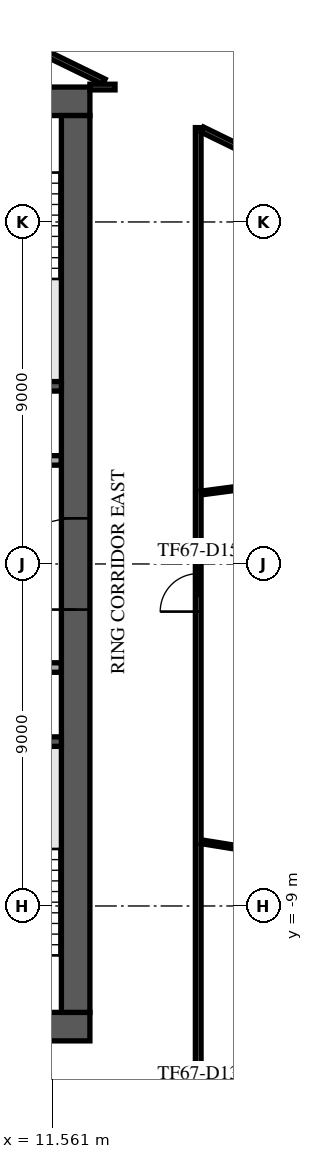
"""IFC4 building model, lengths in metres.
Left out: names, types, materials, properties, quantities, classifications, styles, units other than length and angle.
Written with IfcOpenShell. Run it as: python <this file> out.ifc"""

import sys

from ifc_helpers import new_model, si_unit, direction, frame, frame_2d, origin, place, context, subcontext, project, spatial, rectangle, extrude, element, fill, save


model = new_model("IFC4")
c1 = context("Model", 3, precision=1e-05, world=origin(), true_north=direction((0.0, 1.0)))
c2 = subcontext(c1, "Body", "Model", "MODEL_VIEW")
j1 = project(units=[si_unit("LENGTHUNIT", "METRE"), si_unit("PLANEANGLEUNIT", "RADIAN")], contexts=[c1])
p1 = place(None, origin())
s1 = spatial("IfcSite", under=j1, at=p1, CompositionType="ELEMENT")
p2 = place(p1, origin())
s2 = spatial("IfcBuilding", under=s1, at=p2, CompositionType="ELEMENT")
p3 = place(p2, frame((0.0, 0.0, 282.9)))
s3 = spatial("IfcBuildingStorey", under=s2, at=p3, CompositionType="ELEMENT", Elevation=282.9)
p4 = place(p3, frame((-12.55, 12.175, 0.0), z_axis=(0.0, 0.0, 1.0), x_axis=(1.0, 0.0, 0.0)))
e1 = element("IfcWall", 1, at=p4, inside=s3, PredefinedType="SHEAR", context=c2, shape_type="SweptSolid", body=[
    extrude(rectangle(XDim=25.1, YDim=0.75, at=frame_2d((12.55, 0.0))), origin(), (0.0, 0.0, 1.0), 3.64),
])
p5 = place(p4, frame((11.35, 0.0, 0.0)))
e2 = element("IfcOpeningElement", 2, at=p5, cuts=e1, PredefinedType="OPENING", context=c2, shape_type="SweptSolid", body=[
    extrude(rectangle(XDim=2.4, YDim=2.4, at=frame_2d((1.2, 1.2))), frame((0.0, 0.385, 0.0), z_axis=(0.0, -1.0, 0.0), x_axis=(1.0, 0.0, 0.0)), (0.0, 0.0, 1.0), 0.77),
])
p6 = place(p4, frame((22.175, 0.0, 0.0)))
e3 = element("IfcOpeningElement", 3, at=p6, cuts=e1, PredefinedType="OPENING", context=c2, shape_type="SweptSolid", body=[
    extrude(rectangle(XDim=1.2, YDim=2.1, at=frame_2d((0.6, 1.05))), frame((0.0, 0.385, 0.0), z_axis=(0.0, -1.0, 0.0), x_axis=(1.0, 0.0, 0.0)), (0.0, 0.0, 1.0), 0.77),
])
p7 = place(p4, frame((1.15, 0.0, 0.0)))
e4 = element("IfcOpeningElement", 4, at=p7, cuts=e1, PredefinedType="OPENING", context=c2, shape_type="SweptSolid", body=[
    extrude(rectangle(XDim=1.0, YDim=2.1, at=frame_2d((0.5, 1.05))), frame((0.0, 0.385, 0.0), z_axis=(0.0, -1.0, 0.0), x_axis=(1.0, 0.0, 0.0)), (0.0, 0.0, 1.0), 0.77),
])
p8 = place(p3, frame((-12.55, -12.175, 0.0), z_axis=(0.0, 0.0, 1.0), x_axis=(1.0, 0.0, 0.0)))
e5 = element("IfcWall", 5, at=p8, inside=s3, PredefinedType="SHEAR", context=c2, shape_type="SweptSolid", body=[
    extrude(rectangle(XDim=25.1, YDim=0.75, at=frame_2d((12.55, 0.0))), origin(), (0.0, 0.0, 1.0), 3.64),
])
p9 = place(p8, frame((7.45, 0.0, 0.0)))
e6 = element("IfcOpeningElement", 6, at=p9, cuts=e5, PredefinedType="OPENING", context=c2, shape_type="SweptSolid", body=[
    extrude(rectangle(XDim=2.0, YDim=2.1, at=frame_2d((1.0, 1.05))), frame((0.0, 0.385, 0.0), z_axis=(0.0, -1.0, 0.0), x_axis=(1.0, 0.0, 0.0)), (0.0, 0.0, 1.0), 0.77),
])
p10 = place(p8, frame((17.575, 0.0, 0.0)))
e7 = element("IfcOpeningElement", 7, at=p10, cuts=e5, PredefinedType="OPENING", context=c2, shape_type="SweptSolid", body=[
    extrude(rectangle(XDim=1.2, YDim=2.1, at=frame_2d((0.6, 1.05))), frame((0.0, 0.385, 0.0), z_axis=(0.0, -1.0, 0.0), x_axis=(1.0, 0.0, 0.0)), (0.0, 0.0, 1.0), 0.77),
])
p11 = place(p8, frame((1.725, 0.0, 0.0)))
e8 = element("IfcOpeningElement", 8, at=p11, cuts=e5, PredefinedType="OPENING", context=c2, shape_type="SweptSolid", body=[
    extrude(rectangle(XDim=1.2, YDim=2.1, at=frame_2d((0.6, 1.05))), frame((0.0, 0.385, 0.0), z_axis=(0.0, -1.0, 0.0), x_axis=(1.0, 0.0, 0.0)), (0.0, 0.0, 1.0), 0.77),
])
p12 = place(p8, frame((22.175, 0.0, 0.0)))
e9 = element("IfcOpeningElement", 9, at=p12, cuts=e5, PredefinedType="OPENING", context=c2, shape_type="SweptSolid", body=[
    extrude(rectangle(XDim=1.2, YDim=2.1, at=frame_2d((0.6, 1.05))), frame((0.0, 0.385, 0.0), z_axis=(0.0, -1.0, 0.0), x_axis=(1.0, 0.0, 0.0)), (0.0, 0.0, 1.0), 0.77),
])
p13 = place(p3, frame((12.175, -11.8, 0.0), z_axis=(0.0, 0.0, 1.0), x_axis=(0.0, 1.0, 0.0)))
e10 = element("IfcWall", 10, at=p13, inside=s3, PredefinedType="SHEAR", context=c2, shape_type="SweptSolid", body=[
    extrude(rectangle(XDim=23.6, YDim=0.75, at=frame_2d((11.8, 0.0))), origin(), (0.0, 0.0, 1.0), 3.64),
])
p14 = place(p13, frame((10.6, 0.0, 0.0)))
e11 = element("IfcOpeningElement", 11, at=p14, cuts=e10, PredefinedType="OPENING", context=c2, shape_type="SweptSolid", body=[
    extrude(rectangle(XDim=2.4, YDim=2.4, at=frame_2d((1.2, 1.2))), frame((0.0, 0.385, 0.0), z_axis=(0.0, -1.0, 0.0), x_axis=(1.0, 0.0, 0.0)), (0.0, 0.0, 1.0), 0.77),
])
for number, where, z_axis, x_axis in (
    (12, (8.65, 4.675, 0.0), (0.0, 0.0, 1.0), (1.0, 0.0, 0.0)),
    (13, (8.65, -4.675, 0.0), (0.0, 0.0, 1.0), (1.0, 0.0, 0.0)),
):
    element("IfcWall", number, at=place(p3, frame(where, z_axis=z_axis, x_axis=x_axis)), inside=s3, PredefinedType="SOLIDWALL", context=c2, shape_type="SweptSolid", body=[
        extrude(rectangle(XDim=3.15, YDim=0.25, at=frame_2d((1.575, 0.0))), origin(), (0.0, 0.0, 1.0), 3.64),
    ])
p15 = place(p3, frame((5.63, -2.725, 0.0), z_axis=(0.0, 0.0, 1.0), x_axis=(1.0, 0.0, 0.0)))
e14 = element("IfcWall", 14, at=p15, inside=s3, PredefinedType="PARTITIONING", context=c2, shape_type="SweptSolid", body=[
    extrude(rectangle(XDim=6.165, YDim=0.25, at=frame_2d((3.083, 0.0))), origin(), (0.0, 0.0, 1.0), 3.64),
])
p16 = place(p15, frame((0.745, 0.0, 0.0)))
e15 = element("IfcOpeningElement", 15, at=p16, cuts=e14, PredefinedType="OPENING", context=c2, shape_type="SweptSolid", body=[
    extrude(rectangle(XDim=1.0, YDim=2.1, at=frame_2d((0.5, 1.05))), frame((0.0, 0.135, 0.0), z_axis=(0.0, -1.0, 0.0), x_axis=(1.0, 0.0, 0.0)), (0.0, 0.0, 1.0), 0.27),
])
p17 = place(p15, frame((3.92, 0.0, 0.0)))
e16 = element("IfcOpeningElement", 16, at=p17, cuts=e14, PredefinedType="OPENING", context=c2, shape_type="SweptSolid", body=[
    extrude(rectangle(XDim=0.9, YDim=2.1, at=frame_2d((0.45, 1.05))), frame((0.0, 0.135, 0.0), z_axis=(0.0, -1.0, 0.0), x_axis=(1.0, 0.0, 0.0)), (0.0, 0.0, 1.0), 0.27),
])
p18 = place(p3, frame((-11.795, 2.725, 0.0), z_axis=(0.0, 0.0, 1.0), x_axis=(1.0, 0.0, 0.0)))
e17 = element("IfcWall", 17, at=p18, inside=s3, PredefinedType="PARTITIONING", context=c2, shape_type="SweptSolid", body=[
    extrude(rectangle(XDim=23.59, YDim=0.25, at=frame_2d((11.795, 0.0))), origin(), (0.0, 0.0, 1.0), 3.64),
])
p19 = place(p18, frame((21.345, 0.0, 0.0)))
e18 = element("IfcOpeningElement", 18, at=p19, cuts=e17, PredefinedType="OPENING", context=c2, shape_type="SweptSolid", body=[
    extrude(rectangle(XDim=0.9, YDim=2.1, at=frame_2d((0.45, 1.05))), frame((0.0, 0.135, 0.0), z_axis=(0.0, -1.0, 0.0), x_axis=(1.0, 0.0, 0.0)), (0.0, 0.0, 1.0), 0.27),
])
p20 = place(p18, frame((1.345, 0.0, 0.0)))
e19 = element("IfcOpeningElement", 19, at=p20, cuts=e17, PredefinedType="OPENING", context=c2, shape_type="SweptSolid", body=[
    extrude(rectangle(XDim=0.9, YDim=2.1, at=frame_2d((0.45, 1.05))), frame((0.0, 0.135, 0.0), z_axis=(0.0, -1.0, 0.0), x_axis=(1.0, 0.0, 0.0)), (0.0, 0.0, 1.0), 0.27),
])
p21 = place(p18, frame((4.42, 0.0, 0.0)))
e20 = element("IfcOpeningElement", 20, at=p21, cuts=e17, PredefinedType="OPENING", context=c2, shape_type="SweptSolid", body=[
    extrude(rectangle(XDim=1.0, YDim=2.1, at=frame_2d((0.5, 1.05))), frame((0.0, 0.135, 0.0), z_axis=(0.0, -1.0, 0.0), x_axis=(1.0, 0.0, 0.0)), (0.0, 0.0, 1.0), 0.27),
])
p22 = place(p18, frame((7.17, 0.0, 0.0)))
e21 = element("IfcOpeningElement", 21, at=p22, cuts=e17, PredefinedType="OPENING", context=c2, shape_type="SweptSolid", body=[
    extrude(rectangle(XDim=1.0, YDim=2.1, at=frame_2d((0.5, 1.05))), frame((0.0, 0.135, 0.0), z_axis=(0.0, -1.0, 0.0), x_axis=(1.0, 0.0, 0.0)), (0.0, 0.0, 1.0), 0.27),
])
p23 = place(p18, frame((12.57, 0.0, 0.0)))
e22 = element("IfcOpeningElement", 22, at=p23, cuts=e17, PredefinedType="OPENING", context=c2, shape_type="SweptSolid", body=[
    extrude(rectangle(XDim=1.2, YDim=2.1, at=frame_2d((0.6, 1.05))), frame((0.0, 0.135, 0.0), z_axis=(0.0, -1.0, 0.0), x_axis=(1.0, 0.0, 0.0)), (0.0, 0.0, 1.0), 0.27),
])
p24 = place(p3, frame((10.36, -32.137, 0.0), z_axis=(0.0, 0.0, 1.0), x_axis=(0.438372256832, 0.898793504894, 0.0)))
e23 = element("IfcWall", 23, at=p24, inside=s3, PredefinedType="STANDARD", context=c2, shape_type="SweptSolid", body=[
    extrude(rectangle(XDim=48.687, YDim=0.6, at=frame_2d((24.343, 0.0))), origin(), (0.0, 0.0, 1.0), 3.64),
])
p25 = place(p24, frame((1.213, 0.0, 0.9)))
e24 = element("IfcOpeningElement", 24, at=p25, cuts=e23, PredefinedType="OPENING", context=c2, shape_type="SweptSolid", body=[
    extrude(rectangle(XDim=2.0, YDim=2.1, at=frame_2d((1.0, 1.05))), frame((0.0, 0.31, 0.0), z_axis=(0.0, -1.0, 0.0), x_axis=(1.0, 0.0, 0.0)), (0.0, 0.0, 1.0), 0.62),
])
p26 = place(p24, frame((5.639, 0.0, 0.9)))
e25 = element("IfcOpeningElement", 25, at=p26, cuts=e23, PredefinedType="OPENING", context=c2, shape_type="SweptSolid", body=[
    extrude(rectangle(XDim=2.0, YDim=2.1, at=frame_2d((1.0, 1.05))), frame((0.0, 0.31, 0.0), z_axis=(0.0, -1.0, 0.0), x_axis=(1.0, 0.0, 0.0)), (0.0, 0.0, 1.0), 0.62),
])
p27 = place(p24, frame((10.065, 0.0, 0.9)))
e26 = element("IfcOpeningElement", 26, at=p27, cuts=e23, PredefinedType="OPENING", context=c2, shape_type="SweptSolid", body=[
    extrude(rectangle(XDim=2.0, YDim=2.1, at=frame_2d((1.0, 1.05))), frame((0.0, 0.31, 0.0), z_axis=(0.0, -1.0, 0.0), x_axis=(1.0, 0.0, 0.0)), (0.0, 0.0, 1.0), 0.62),
])
p28 = place(p24, frame((14.491, 0.0, 0.9)))
e27 = element("IfcOpeningElement", 27, at=p28, cuts=e23, PredefinedType="OPENING", context=c2, shape_type="SweptSolid", body=[
    extrude(rectangle(XDim=2.0, YDim=2.1, at=frame_2d((1.0, 1.05))), frame((0.0, 0.31, 0.0), z_axis=(0.0, -1.0, 0.0), x_axis=(1.0, 0.0, 0.0)), (0.0, 0.0, 1.0), 0.62),
])
p29 = place(p24, frame((18.917, 0.0, 0.9)))
e28 = element("IfcOpeningElement", 28, at=p29, cuts=e23, PredefinedType="OPENING", context=c2, shape_type="SweptSolid", body=[
    extrude(rectangle(XDim=2.0, YDim=2.1, at=frame_2d((1.0, 1.05))), frame((0.0, 0.31, 0.0), z_axis=(0.0, -1.0, 0.0), x_axis=(1.0, 0.0, 0.0)), (0.0, 0.0, 1.0), 0.62),
])
p30 = place(p24, frame((23.343, 0.0, 0.9)))
e29 = element("IfcOpeningElement", 29, at=p30, cuts=e23, PredefinedType="OPENING", context=c2, shape_type="SweptSolid", body=[
    extrude(rectangle(XDim=2.0, YDim=2.1, at=frame_2d((1.0, 1.05))), frame((0.0, 0.31, 0.0), z_axis=(0.0, -1.0, 0.0), x_axis=(1.0, 0.0, 0.0)), (0.0, 0.0, 1.0), 0.62),
])
p31 = place(p24, frame((27.769, 0.0, 0.9)))
e30 = element("IfcOpeningElement", 30, at=p31, cuts=e23, PredefinedType="OPENING", context=c2, shape_type="SweptSolid", body=[
    extrude(rectangle(XDim=2.0, YDim=2.1, at=frame_2d((1.0, 1.05))), frame((0.0, 0.31, 0.0), z_axis=(0.0, -1.0, 0.0), x_axis=(1.0, 0.0, 0.0)), (0.0, 0.0, 1.0), 0.62),
])
p32 = place(p24, frame((32.195, 0.0, 0.9)))
e31 = element("IfcOpeningElement", 31, at=p32, cuts=e23, PredefinedType="OPENING", context=c2, shape_type="SweptSolid", body=[
    extrude(rectangle(XDim=2.0, YDim=2.1, at=frame_2d((1.0, 1.05))), frame((0.0, 0.31, 0.0), z_axis=(0.0, -1.0, 0.0), x_axis=(1.0, 0.0, 0.0)), (0.0, 0.0, 1.0), 0.62),
])
p33 = place(p24, frame((36.621, 0.0, 0.9)))
e32 = element("IfcOpeningElement", 32, at=p33, cuts=e23, PredefinedType="OPENING", context=c2, shape_type="SweptSolid", body=[
    extrude(rectangle(XDim=2.0, YDim=2.1, at=frame_2d((1.0, 1.05))), frame((0.0, 0.31, 0.0), z_axis=(0.0, -1.0, 0.0), x_axis=(1.0, 0.0, 0.0)), (0.0, 0.0, 1.0), 0.62),
])
p34 = place(p24, frame((41.047, 0.0, 0.9)))
e33 = element("IfcOpeningElement", 33, at=p34, cuts=e23, PredefinedType="OPENING", context=c2, shape_type="SweptSolid", body=[
    extrude(rectangle(XDim=2.0, YDim=2.1, at=frame_2d((1.0, 1.05))), frame((0.0, 0.31, 0.0), z_axis=(0.0, -1.0, 0.0), x_axis=(1.0, 0.0, 0.0)), (0.0, 0.0, 1.0), 0.62),
])
p35 = place(p24, frame((45.473, 0.0, 0.9)))
e34 = element("IfcOpeningElement", 34, at=p35, cuts=e23, PredefinedType="OPENING", context=c2, shape_type="SweptSolid", body=[
    extrude(rectangle(XDim=2.0, YDim=2.1, at=frame_2d((1.0, 1.05))), frame((0.0, 0.31, 0.0), z_axis=(0.0, -1.0, 0.0), x_axis=(1.0, 0.0, 0.0)), (0.0, 0.0, 1.0), 0.62),
])
p36 = place(p3, frame((-9.104, 26.104, 0.0), z_axis=(0.0, 0.0, 1.0), x_axis=(0.898795233888, -0.438368711864, 0.0)))
e35 = element("IfcWall", 35, at=p36, inside=s3, PredefinedType="PARTITIONING", context=c2, shape_type="SweptSolid", body=[
    extrude(rectangle(XDim=39.325, YDim=0.15, at=frame_2d((19.663, 0.0))), origin(), (0.0, 0.0, 1.0), 3.04),
])
p37 = place(p36, frame((2.8, 0.0, 0.0)))
e36 = element("IfcOpeningElement", 36, at=p37, cuts=e35, PredefinedType="OPENING", context=c2, shape_type="SweptSolid", body=[
    extrude(rectangle(XDim=1.8, YDim=2.1, at=frame_2d((0.9, 1.05))), frame((0.0, 0.085, 0.0), z_axis=(0.0, -1.0, 0.0), x_axis=(1.0, 0.0, 0.0)), (0.0, 0.0, 1.0), 0.17),
])
p38 = place(p36, frame((15.419, 0.0, 0.0)))
e37 = element("IfcOpeningElement", 37, at=p38, cuts=e35, PredefinedType="OPENING", context=c2, shape_type="SweptSolid", body=[
    extrude(rectangle(XDim=1.0, YDim=2.1, at=frame_2d((0.5, 1.05))), frame((0.0, 0.085, 0.0), z_axis=(0.0, -1.0, 0.0), x_axis=(1.0, 0.0, 0.0)), (0.0, 0.0, 1.0), 0.17),
])
p39 = place(p36, frame((19.371, 0.0, 0.0)))
e38 = element("IfcOpeningElement", 38, at=p39, cuts=e35, PredefinedType="OPENING", context=c2, shape_type="SweptSolid", body=[
    extrude(rectangle(XDim=1.0, YDim=2.1, at=frame_2d((0.5, 1.05))), frame((0.0, 0.085, 0.0), z_axis=(0.0, -1.0, 0.0), x_axis=(1.0, 0.0, 0.0)), (0.0, 0.0, 1.0), 0.17),
])
p40 = place(p3, frame((5.427, 16.347, 0.0), z_axis=(0.0, 0.0, 1.0), x_axis=(0.898771260275, -0.43841786198, 0.0)))
e39 = element("IfcWall", 39, at=p40, inside=s3, PredefinedType="PARTITIONING", context=c2, shape_type="SweptSolid", body=[
    extrude(rectangle(XDim=8.336, YDim=0.15, at=frame_2d((4.168, 0.0))), origin(), (0.0, 0.0, 1.0), 3.24),
])
p41 = place(p40, frame((2.3, 0.0, 0.0)))
e40 = element("IfcOpeningElement", 40, at=p41, cuts=e39, PredefinedType="OPENING", context=c2, shape_type="SweptSolid", body=[
    extrude(rectangle(XDim=1.0, YDim=2.1, at=frame_2d((0.5, 1.05))), frame((0.0, 0.085, 0.0), z_axis=(0.0, -1.0, 0.0), x_axis=(1.0, 0.0, 0.0)), (0.0, 0.0, 1.0), 0.17),
])
p42 = place(p3, frame((12.55, 12.55, 0.0), z_axis=(0.0, 0.0, 1.0), x_axis=(1.0, 0.0, 0.0)))
e41 = element("IfcWall", 41, at=p42, inside=s3, PredefinedType="PARTITIONING", context=c2, shape_type="SweptSolid", body=[
    extrude(rectangle(XDim=0.661, YDim=0.15, at=frame_2d((0.331, 0.0))), origin(), (0.0, 0.0, 1.0), 3.24),
])
p43 = place(p3, frame((15.4, -15.325, 0.0), z_axis=(0.0, 0.0, 1.0), x_axis=(0.0, 1.0, 0.0)))
e42 = element("IfcWall", 42, at=p43, inside=s3, PredefinedType="PARTITIONING", context=c2, shape_type="SweptSolid", body=[
    extrude(rectangle(XDim=26.808, YDim=0.15, at=frame_2d((13.404, 0.0))), origin(), (0.0, 0.0, 1.0), 3.24),
])
p44 = place(p43, frame((0.3, 0.0, 0.0)))
e43 = element("IfcOpeningElement", 43, at=p44, cuts=e42, PredefinedType="OPENING", context=c2, shape_type="SweptSolid", body=[
    extrude(rectangle(XDim=1.0, YDim=2.1, at=frame_2d((0.5, 1.05))), frame((0.0, 0.085, 0.0), z_axis=(0.0, -1.0, 0.0), x_axis=(1.0, 0.0, 0.0)), (0.0, 0.0, 1.0), 0.17),
])
p45 = place(p43, frame((14.072, 0.0, 0.0)))
e44 = element("IfcOpeningElement", 44, at=p45, cuts=e42, PredefinedType="OPENING", context=c2, shape_type="SweptSolid", body=[
    extrude(rectangle(XDim=1.0, YDim=2.1, at=frame_2d((0.5, 1.05))), frame((0.0, 0.085, 0.0), z_axis=(0.0, -1.0, 0.0), x_axis=(1.0, 0.0, 0.0)), (0.0, 0.0, 1.0), 0.17),
])
p46 = place(p3, frame((15.508, 11.43, 0.0), z_axis=(0.0, 0.0, 1.0), x_axis=(0.898789572526, -0.438380319264, 0.0)))
e45 = element("IfcWall", 45, at=p46, inside=s3, PredefinedType="PARTITIONING", context=c2, shape_type="SweptSolid", body=[
    extrude(rectangle(XDim=10.772, YDim=0.15, at=frame_2d((5.386, 0.0))), origin(), (0.0, 0.0, 1.0), 3.24),
])
p47 = place(p46, frame((1.8, 0.0, 0.0)))
e46 = element("IfcOpeningElement", 46, at=p47, cuts=e45, PredefinedType="OPENING", context=c2, shape_type="SweptSolid", body=[
    extrude(rectangle(XDim=1.8, YDim=2.1, at=frame_2d((0.9, 1.05))), frame((0.0, 0.085, 0.0), z_axis=(0.0, -1.0, 0.0), x_axis=(1.0, 0.0, 0.0)), (0.0, 0.0, 1.0), 0.17),
])
p48 = place(p46, frame((8.3, 0.0, 0.0)))
e47 = element("IfcOpeningElement", 47, at=p48, cuts=e45, PredefinedType="OPENING", context=c2, shape_type="SweptSolid", body=[
    extrude(rectangle(XDim=1.0, YDim=2.1, at=frame_2d((0.5, 1.05))), frame((0.0, 0.085, 0.0), z_axis=(0.0, -1.0, 0.0), x_axis=(1.0, 0.0, 0.0)), (0.0, 0.0, 1.0), 0.17),
])
p49 = place(p3, frame((15.483, -7.31, 0.0), z_axis=(0.0, 0.0, 1.0), x_axis=(0.987314947832, -0.158774033734, 0.0)))
e48 = element("IfcWall", 48, at=p49, inside=s3, PredefinedType="PARTITIONING", context=c2, shape_type="SweptSolid", body=[
    extrude(rectangle(XDim=6.246, YDim=0.1, at=frame_2d((3.123, 0.0))), origin(), (0.0, 0.0, 1.0), 3.04),
])
p50 = place(p3, frame((15.482, 1.868, 0.0), z_axis=(0.0, 0.0, 1.0), x_axis=(0.991377248415, 0.131038739785, 0.0)))
e49 = element("IfcWall", 49, at=p50, inside=s3, PredefinedType="PARTITIONING", context=c2, shape_type="SweptSolid", body=[
    extrude(rectangle(XDim=11.999, YDim=0.1, at=frame_2d((5.999, 0.0))), origin(), (0.0, 0.0, 1.0), 3.04),
])
p51 = place(p14, origin())
e50 = element("IfcDoor", 50, at=p51, inside=s3, OperationType="SINGLE_SWING_LEFT", PredefinedType="DOOR", context=c2, shape_type="SweptSolid", body=[
    extrude(rectangle(XDim=2.4, YDim=2.4, at=frame_2d((1.2, 1.2))), frame((0.0, 0.025, 0.0), z_axis=(0.0, -1.0, 0.0), x_axis=(1.0, 0.0, 0.0)), (0.0, 0.0, 1.0), 0.05),
])
fill(e11, e50)
p52 = place(p45, frame((1.0, 0.0, 0.0), z_axis=(0.0, 0.0, 1.0), x_axis=(-1.0, 0.0, 0.0)))
e51 = element("IfcDoor", 51, at=p52, inside=s3, OperationType="SINGLE_SWING_RIGHT", PredefinedType="DOOR", context=c2, shape_type="SweptSolid", body=[
    extrude(rectangle(XDim=1.0, YDim=2.1, at=frame_2d((0.5, 1.05))), frame((0.0, 0.025, 0.0), z_axis=(0.0, -1.0, 0.0), x_axis=(1.0, 0.0, 0.0)), (0.0, 0.0, 1.0), 0.05),
])
fill(e44, e51)
save(model, sys.argv[1])
